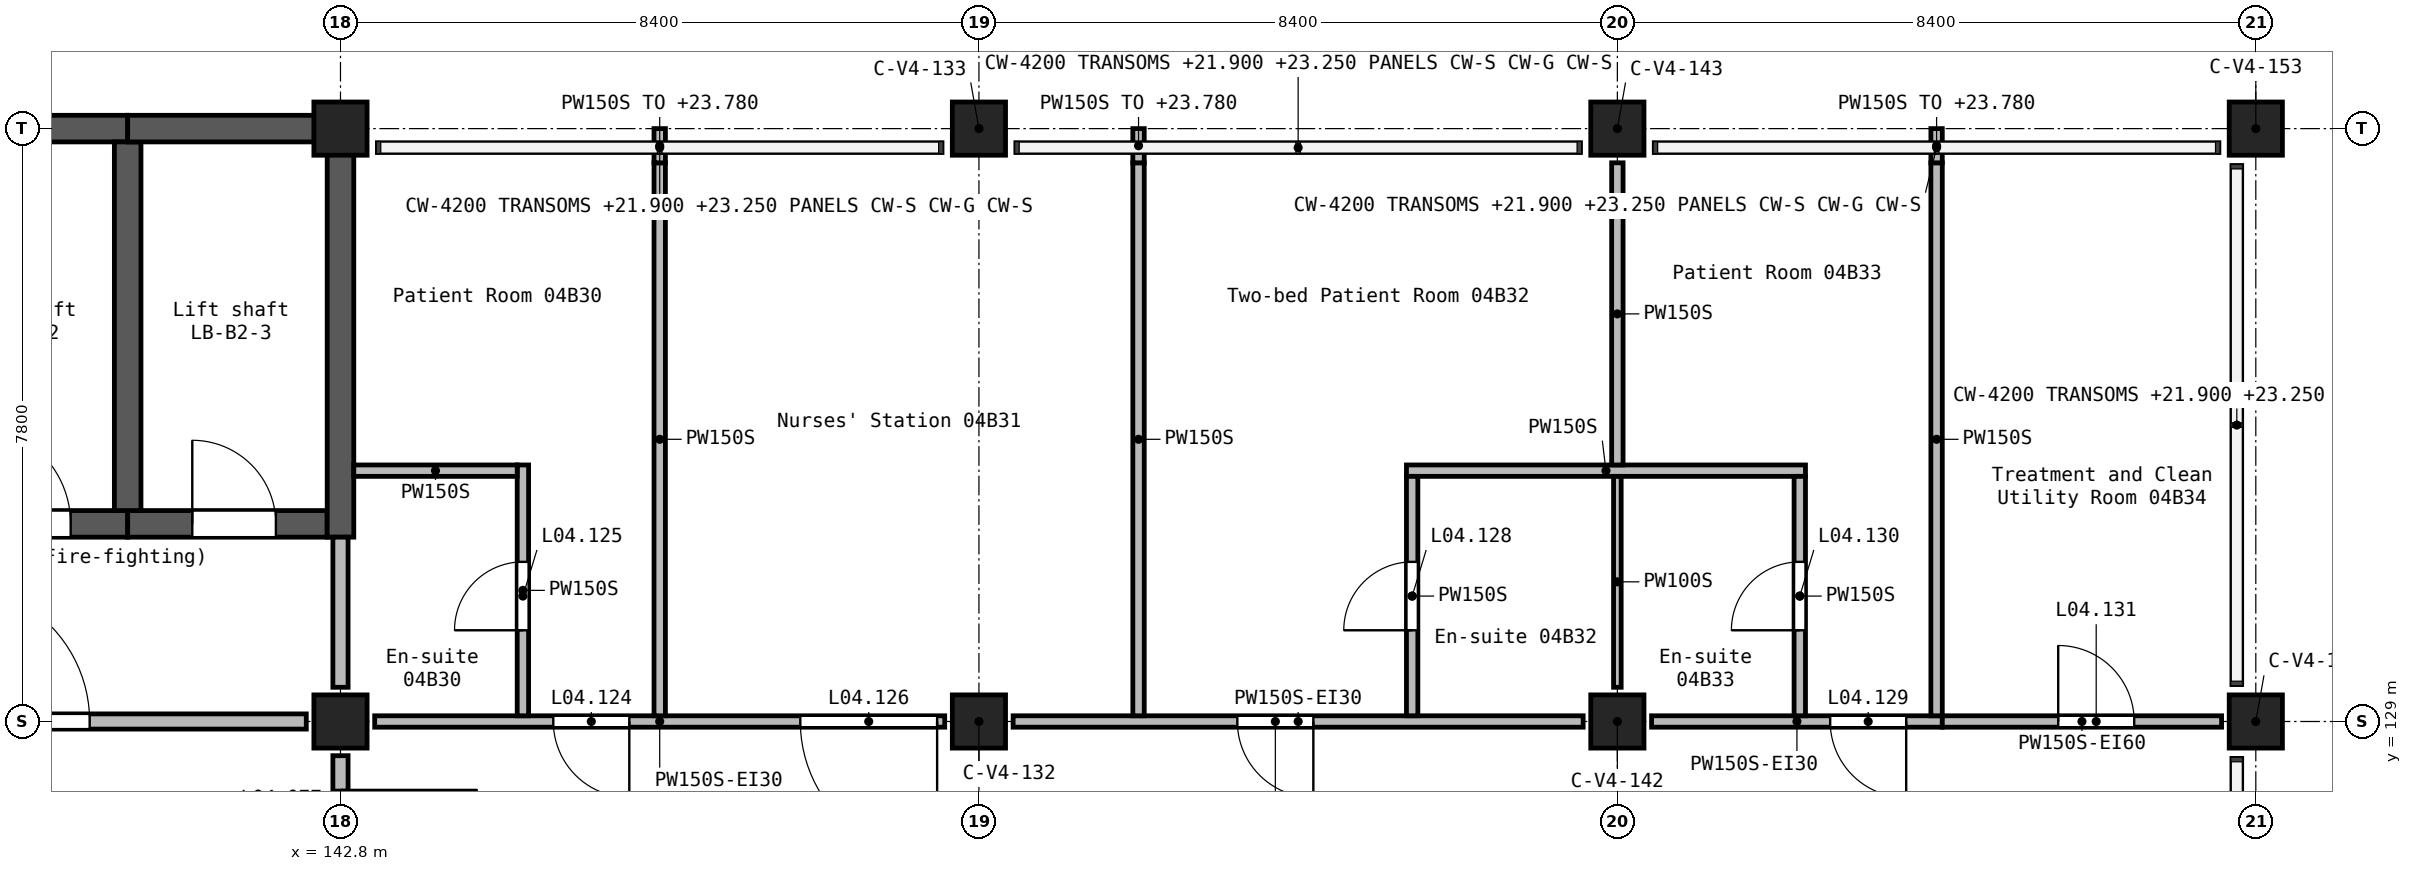
"""IFC4 building model, lengths in metres.
Left out: names, types, materials, properties, quantities, classifications, styles, units other than length and angle.
Written with IfcOpenShell. Run it as: python <this file> out.ifc"""

import sys

from ifc_helpers import new_model, si_unit, direction, frame, frame_2d, origin, origin_2d, place, context, subcontext, project, spatial, rectangle, extrude, element, fill, save


model = new_model("IFC4")
c1 = context("Model", 3, precision=1e-05, world=origin(), true_north=direction((0.0, 1.0)))
c2 = subcontext(c1, "Body", "Model", "MODEL_VIEW")
j1 = project(units=[si_unit("LENGTHUNIT", "METRE"), si_unit("PLANEANGLEUNIT", "RADIAN")], contexts=[c1])
p1 = place(None, origin())
s1 = spatial("IfcSite", under=j1, at=p1, CompositionType="ELEMENT")
p2 = place(p1, origin())
s2 = spatial("IfcBuilding", under=s1, at=p2, CompositionType="ELEMENT")
p3 = place(p2, frame((0.0, 0.0, 21.0)))
s3 = spatial("IfcBuildingStorey", under=s2, at=p3, CompositionType="ELEMENT", Elevation=21.0)
for number, where, z_axis, x_axis in (
    (1, (142.8, 129.0, 0.0), (0.0, 0.0, 1.0), (1.0, 0.0, 0.0)),
    (2, (142.8, 136.8, 0.0), (0.0, 0.0, 1.0), (1.0, 0.0, 0.0)),
    (3, (151.2, 129.0, 0.0), (0.0, 0.0, 1.0), (1.0, 0.0, 0.0)),
    (4, (151.2, 136.8, 0.0), (0.0, 0.0, 1.0), (1.0, 0.0, 0.0)),
    (5, (159.6, 129.0, 0.0), (0.0, 0.0, 1.0), (1.0, 0.0, 0.0)),
    (6, (159.6, 136.8, 0.0), (0.0, 0.0, 1.0), (1.0, 0.0, 0.0)),
    (7, (168.0, 129.0, 0.0), (0.0, 0.0, 1.0), (1.0, 0.0, 0.0)),
    (8, (168.0, 136.8, 0.0), (0.0, 0.0, 1.0), (1.0, 0.0, 0.0)),
):
    element("IfcColumn", number, at=place(p3, frame(where, z_axis=z_axis, x_axis=x_axis)), inside=s3, PredefinedType="COLUMN", context=c2, shape_type="SweptSolid", body=[
        extrude(rectangle(XDim=0.7, YDim=0.7, at=origin_2d()), origin(), (0.0, 0.0, 1.0), 3.9),
    ])
p4 = place(p3, frame((137.2, 131.6, 0.0), z_axis=(0.0, 0.0, 1.0), x_axis=(1.0, 0.0, 0.0)))
e9 = element("IfcWall", 9, at=p4, inside=s3, PredefinedType="SHEAR", context=c2, shape_type="SweptSolid", body=[
    extrude(rectangle(XDim=2.8, YDim=0.35, at=frame_2d((1.4, 0.0))), origin(), (0.0, 0.0, 1.0), 3.9),
])
p5 = place(p4, frame((0.75, 0.0, 0.0)))
e10 = element("IfcOpeningElement", 10, at=p5, cuts=e9, PredefinedType="OPENING", context=c2, shape_type="SweptSolid", body=[
    extrude(rectangle(XDim=1.3, YDim=2.1, at=frame_2d((0.65, 1.05))), frame((0.0, 0.185, 0.0), z_axis=(0.0, -1.0, 0.0), x_axis=(1.0, 0.0, 0.0)), (0.0, 0.0, 1.0), 0.37),
])
p6 = place(p3, frame((137.2, 136.8, 0.0), z_axis=(0.0, 0.0, 1.0), x_axis=(1.0, 0.0, 0.0)))
e11 = element("IfcWall", 11, at=p6, inside=s3, PredefinedType="SHEAR", context=c2, shape_type="SweptSolid", body=[
    extrude(rectangle(XDim=2.8, YDim=0.35, at=frame_2d((1.4, 0.0))), origin(), (0.0, 0.0, 1.0), 3.9),
])
p7 = place(p3, frame((140.0, 131.6, 0.0), z_axis=(0.0, 0.0, 1.0), x_axis=(1.0, 0.0, 0.0)))
e12 = element("IfcWall", 12, at=p7, inside=s3, PredefinedType="SHEAR", context=c2, shape_type="SweptSolid", body=[
    extrude(rectangle(XDim=2.625, YDim=0.35, at=frame_2d((1.312, 0.0))), origin(), (0.0, 0.0, 1.0), 3.9),
])
p8 = place(p7, frame((0.85, 0.0, 0.0)))
e13 = element("IfcOpeningElement", 13, at=p8, cuts=e12, PredefinedType="OPENING", context=c2, shape_type="SweptSolid", body=[
    extrude(rectangle(XDim=1.1, YDim=2.1, at=frame_2d((0.55, 1.05))), frame((0.0, 0.185, 0.0), z_axis=(0.0, -1.0, 0.0), x_axis=(1.0, 0.0, 0.0)), (0.0, 0.0, 1.0), 0.37),
])
p9 = place(p3, frame((140.0, 131.775, 0.0), z_axis=(0.0, 0.0, 1.0), x_axis=(0.0, 1.0, 0.0)))
e14 = element("IfcWall", 14, at=p9, inside=s3, PredefinedType="SHEAR", context=c2, shape_type="SweptSolid", body=[
    extrude(rectangle(XDim=4.85, YDim=0.35, at=frame_2d((2.425, 0.0))), origin(), (0.0, 0.0, 1.0), 3.9),
])
p10 = place(p3, frame((140.0, 136.8, 0.0), z_axis=(0.0, 0.0, 1.0), x_axis=(1.0, 0.0, 0.0)))
e15 = element("IfcWall", 15, at=p10, inside=s3, PredefinedType="SHEAR", context=c2, shape_type="SweptSolid", body=[
    extrude(rectangle(XDim=2.625, YDim=0.35, at=frame_2d((1.312, 0.0))), origin(), (0.0, 0.0, 1.0), 3.9),
])
p11 = place(p3, frame((142.8, 131.425, 0.0), z_axis=(0.0, 0.0, 1.0), x_axis=(0.0, 1.0, 0.0)))
e16 = element("IfcWall", 16, at=p11, inside=s3, PredefinedType="SHEAR", context=c2, shape_type="SweptSolid", body=[
    extrude(rectangle(XDim=5.55, YDim=0.35, at=frame_2d((2.775, 0.0))), origin(), (0.0, 0.0, 1.0), 3.9),
])
p12 = place(p3, frame((142.8, 131.425, 0.0), z_axis=(0.0, 0.0, 1.0), x_axis=(0.0, -1.0, 0.0)))
e17 = element("IfcWall", 17, at=p12, inside=s3, PredefinedType="SOLIDWALL", context=c2, shape_type="SweptSolid", body=[
    extrude(rectangle(XDim=1.975, YDim=0.2, at=frame_2d((0.988, 0.0))), origin(), (0.0, 0.0, 1.0), 3.6),
])
p13 = place(p3, frame((142.8, 128.55, 0.0), z_axis=(0.0, 0.0, 1.0), x_axis=(0.0, -1.0, 0.0)))
e18 = element("IfcWall", 18, at=p13, inside=s3, PredefinedType="SOLIDWALL", context=c2, shape_type="SweptSolid", body=[
    extrude(rectangle(XDim=2.7, YDim=0.2, at=frame_2d((1.35, 0.0))), origin(), (0.0, 0.0, 1.0), 3.6),
])
p14 = place(p13, frame((0.45, 0.0, 0.0)))
e19 = element("IfcOpeningElement", 19, at=p14, cuts=e18, PredefinedType="OPENING", context=c2, shape_type="SweptSolid", body=[
    extrude(rectangle(XDim=1.8, YDim=2.1, at=frame_2d((0.9, 1.05))), frame((0.0, 0.11, 0.0), z_axis=(0.0, -1.0, 0.0), x_axis=(1.0, 0.0, 0.0)), (0.0, 0.0, 1.0), 0.22),
])
p15 = place(p3, frame((134.85, 129.0, 0.0), z_axis=(0.0, 0.0, 1.0), x_axis=(1.0, 0.0, 0.0)))
e20 = element("IfcWall", 20, at=p15, inside=s3, PredefinedType="SOLIDWALL", context=c2, shape_type="SweptSolid", body=[
    extrude(rectangle(XDim=7.5, YDim=0.2, at=frame_2d((3.75, 0.0))), origin(), (0.0, 0.0, 1.0), 3.6),
])
p16 = place(p15, frame((2.85, 0.0, 0.0)))
e21 = element("IfcOpeningElement", 21, at=p16, cuts=e20, PredefinedType="OPENING", context=c2, shape_type="SweptSolid", body=[
    extrude(rectangle(XDim=1.8, YDim=2.1, at=frame_2d((0.9, 1.05))), frame((0.0, 0.11, 0.0), z_axis=(0.0, -1.0, 0.0), x_axis=(1.0, 0.0, 0.0)), (0.0, 0.0, 1.0), 0.22),
])
p17 = place(p3, frame((163.875, 129.0, 0.0), z_axis=(0.0, 0.0, 1.0), x_axis=(-1.0, 0.0, 0.0)))
e22 = element("IfcWall", 22, at=p17, inside=s3, PredefinedType="PARTITIONING", context=c2, shape_type="SweptSolid", body=[
    extrude(rectangle(XDim=3.825, YDim=0.15, at=frame_2d((1.913, 0.0))), origin(), (0.0, 0.0, 1.0), 3.6),
])
p18 = place(p17, frame((0.475, 0.0, 0.0)))
e23 = element("IfcOpeningElement", 23, at=p18, cuts=e22, PredefinedType="OPENING", context=c2, shape_type="SweptSolid", body=[
    extrude(rectangle(XDim=1.0, YDim=2.1, at=frame_2d((0.5, 1.05))), frame((0.0, 0.085, 0.0), z_axis=(0.0, -1.0, 0.0), x_axis=(1.0, 0.0, 0.0)), (0.0, 0.0, 1.0), 0.17),
])
p19 = place(p3, frame((159.15, 129.0, 0.0), z_axis=(0.0, 0.0, 1.0), x_axis=(-1.0, 0.0, 0.0)))
e24 = element("IfcWall", 24, at=p19, inside=s3, PredefinedType="PARTITIONING", context=c2, shape_type="SweptSolid", body=[
    extrude(rectangle(XDim=7.5, YDim=0.15, at=frame_2d((3.75, 0.0))), origin(), (0.0, 0.0, 1.0), 3.6),
])
p20 = place(p19, frame((3.55, 0.0, 0.0)))
e25 = element("IfcOpeningElement", 25, at=p20, cuts=e24, PredefinedType="OPENING", context=c2, shape_type="SweptSolid", body=[
    extrude(rectangle(XDim=1.0, YDim=2.1, at=frame_2d((0.5, 1.05))), frame((0.0, 0.085, 0.0), z_axis=(0.0, -1.0, 0.0), x_axis=(1.0, 0.0, 0.0)), (0.0, 0.0, 1.0), 0.17),
])
p21 = place(p3, frame((150.75, 129.0, 0.0), z_axis=(0.0, 0.0, 1.0), x_axis=(-1.0, 0.0, 0.0)))
e26 = element("IfcWall", 26, at=p21, inside=s3, PredefinedType="PARTITIONING", context=c2, shape_type="SweptSolid", body=[
    extrude(rectangle(XDim=7.5, YDim=0.15, at=frame_2d((3.75, 0.0))), origin(), (0.0, 0.0, 1.0), 3.6),
])
p22 = place(p21, frame((4.15, 0.0, 0.0)))
e27 = element("IfcOpeningElement", 27, at=p22, cuts=e26, PredefinedType="OPENING", context=c2, shape_type="SweptSolid", body=[
    extrude(rectangle(XDim=1.0, YDim=2.1, at=frame_2d((0.5, 1.05))), frame((0.0, 0.085, 0.0), z_axis=(0.0, -1.0, 0.0), x_axis=(1.0, 0.0, 0.0)), (0.0, 0.0, 1.0), 0.17),
])
p23 = place(p21, frame((0.1, 0.0, 0.0)))
e28 = element("IfcOpeningElement", 28, at=p23, cuts=e26, PredefinedType="OPENING", context=c2, shape_type="SweptSolid", body=[
    extrude(rectangle(XDim=1.8, YDim=2.1, at=frame_2d((0.9, 1.05))), frame((0.0, 0.085, 0.0), z_axis=(0.0, -1.0, 0.0), x_axis=(1.0, 0.0, 0.0)), (0.0, 0.0, 1.0), 0.17),
])
p24 = place(p3, frame((163.875, 129.0, 0.0), z_axis=(0.0, 0.0, 1.0), x_axis=(1.0, 0.0, 0.0)))
e29 = element("IfcWall", 29, at=p24, inside=s3, PredefinedType="PARTITIONING", context=c2, shape_type="SweptSolid", body=[
    extrude(rectangle(XDim=3.675, YDim=0.15, at=frame_2d((1.837, 0.0))), origin(), (0.0, 0.0, 1.0), 3.6),
])
p25 = place(p24, frame((1.525, 0.0, 0.0)))
e30 = element("IfcOpeningElement", 30, at=p25, cuts=e29, PredefinedType="OPENING", context=c2, shape_type="SweptSolid", body=[
    extrude(rectangle(XDim=1.0, YDim=2.1, at=frame_2d((0.5, 1.05))), frame((0.0, 0.085, 0.0), z_axis=(0.0, -1.0, 0.0), x_axis=(1.0, 0.0, 0.0)), (0.0, 0.0, 1.0), 0.17),
])
p26 = place(p3, frame((147.0, 129.075, 0.0), z_axis=(0.0, 0.0, 1.0), x_axis=(0.0, 1.0, 0.0)))
e31 = element("IfcWall", 31, at=p26, inside=s3, PredefinedType="PARTITIONING", context=c2, shape_type="SweptSolid", body=[
    extrude(rectangle(XDim=7.275, YDim=0.15, at=frame_2d((3.638, 0.0))), origin(), (0.0, 0.0, 1.0), 3.6),
])
p27 = place(p3, frame((147.0, 136.35, 0.0), z_axis=(0.0, 0.0, 1.0), x_axis=(0.0, 1.0, 0.0)))
e32 = element("IfcWall", 32, at=p27, inside=s3, PredefinedType="PARTITIONING", context=c2, shape_type="SweptSolid", body=[
    extrude(rectangle(XDim=0.45, YDim=0.15, at=frame_2d((0.225, 0.0))), origin(), (0.0, 0.0, 1.0), 2.78),
])
p28 = place(p3, frame((153.3, 129.075, 0.0), z_axis=(0.0, 0.0, 1.0), x_axis=(0.0, 1.0, 0.0)))
e33 = element("IfcWall", 33, at=p28, inside=s3, PredefinedType="PARTITIONING", context=c2, shape_type="SweptSolid", body=[
    extrude(rectangle(XDim=7.275, YDim=0.15, at=frame_2d((3.638, 0.0))), origin(), (0.0, 0.0, 1.0), 3.6),
])
p29 = place(p3, frame((153.3, 136.35, 0.0), z_axis=(0.0, 0.0, 1.0), x_axis=(0.0, 1.0, 0.0)))
e34 = element("IfcWall", 34, at=p29, inside=s3, PredefinedType="PARTITIONING", context=c2, shape_type="SweptSolid", body=[
    extrude(rectangle(XDim=0.45, YDim=0.15, at=frame_2d((0.225, 0.0))), origin(), (0.0, 0.0, 1.0), 2.78),
])
p30 = place(p3, frame((163.8, 129.075, 0.0), z_axis=(0.0, 0.0, 1.0), x_axis=(0.0, 1.0, 0.0)))
e35 = element("IfcWall", 35, at=p30, inside=s3, PredefinedType="PARTITIONING", context=c2, shape_type="SweptSolid", body=[
    extrude(rectangle(XDim=7.275, YDim=0.15, at=frame_2d((3.638, 0.0))), origin(), (0.0, 0.0, 1.0), 3.6),
])
p31 = place(p3, frame((163.8, 136.35, 0.0), z_axis=(0.0, 0.0, 1.0), x_axis=(0.0, 1.0, 0.0)))
e36 = element("IfcWall", 36, at=p31, inside=s3, PredefinedType="PARTITIONING", context=c2, shape_type="SweptSolid", body=[
    extrude(rectangle(XDim=0.45, YDim=0.15, at=frame_2d((0.225, 0.0))), origin(), (0.0, 0.0, 1.0), 2.78),
])
p32 = place(p3, frame((156.825, 132.3, 0.0), z_axis=(0.0, 0.0, 1.0), x_axis=(1.0, 0.0, 0.0)))
e37 = element("IfcWall", 37, at=p32, inside=s3, PredefinedType="PARTITIONING", context=c2, shape_type="SweptSolid", body=[
    extrude(rectangle(XDim=5.25, YDim=0.15, at=frame_2d((2.625, 0.0))), origin(), (0.0, 0.0, 1.0), 3.6),
])
p33 = place(p3, frame((159.6, 132.375, 0.0), z_axis=(0.0, 0.0, 1.0), x_axis=(0.0, 1.0, 0.0)))
e38 = element("IfcWall", 38, at=p33, inside=s3, PredefinedType="PARTITIONING", context=c2, shape_type="SweptSolid", body=[
    extrude(rectangle(XDim=3.975, YDim=0.15, at=frame_2d((1.988, 0.0))), origin(), (0.0, 0.0, 1.0), 3.6),
])
p34 = place(p3, frame((145.2, 129.075, 0.0), z_axis=(0.0, 0.0, 1.0), x_axis=(0.0, 1.0, 0.0)))
e39 = element("IfcWall", 39, at=p34, inside=s3, PredefinedType="PARTITIONING", context=c2, shape_type="SweptSolid", body=[
    extrude(rectangle(XDim=3.3, YDim=0.15, at=frame_2d((1.65, 0.0))), origin(), (0.0, 0.0, 1.0), 3.6),
])
p35 = place(p34, frame((1.125, 0.0, 0.0)))
e40 = element("IfcOpeningElement", 40, at=p35, cuts=e39, PredefinedType="OPENING", context=c2, shape_type="SweptSolid", body=[
    extrude(rectangle(XDim=0.9, YDim=2.1, at=frame_2d((0.45, 1.05))), frame((0.0, 0.085, 0.0), z_axis=(0.0, -1.0, 0.0), x_axis=(1.0, 0.0, 0.0)), (0.0, 0.0, 1.0), 0.17),
])
p36 = place(p3, frame((156.9, 129.075, 0.0), z_axis=(0.0, 0.0, 1.0), x_axis=(0.0, 1.0, 0.0)))
e41 = element("IfcWall", 41, at=p36, inside=s3, PredefinedType="PARTITIONING", context=c2, shape_type="SweptSolid", body=[
    extrude(rectangle(XDim=3.15, YDim=0.15, at=frame_2d((1.575, 0.0))), origin(), (0.0, 0.0, 1.0), 3.6),
])
p37 = place(p36, frame((1.125, 0.0, 0.0)))
e42 = element("IfcOpeningElement", 42, at=p37, cuts=e41, PredefinedType="OPENING", context=c2, shape_type="SweptSolid", body=[
    extrude(rectangle(XDim=0.9, YDim=2.1, at=frame_2d((0.45, 1.05))), frame((0.0, 0.085, 0.0), z_axis=(0.0, -1.0, 0.0), x_axis=(1.0, 0.0, 0.0)), (0.0, 0.0, 1.0), 0.17),
])
p38 = place(p3, frame((162.0, 129.075, 0.0), z_axis=(0.0, 0.0, 1.0), x_axis=(0.0, 1.0, 0.0)))
e43 = element("IfcWall", 43, at=p38, inside=s3, PredefinedType="PARTITIONING", context=c2, shape_type="SweptSolid", body=[
    extrude(rectangle(XDim=3.15, YDim=0.15, at=frame_2d((1.575, 0.0))), origin(), (0.0, 0.0, 1.0), 3.6),
])
p39 = place(p38, frame((1.125, 0.0, 0.0)))
e44 = element("IfcOpeningElement", 44, at=p39, cuts=e43, PredefinedType="OPENING", context=c2, shape_type="SweptSolid", body=[
    extrude(rectangle(XDim=0.9, YDim=2.1, at=frame_2d((0.45, 1.05))), frame((0.0, 0.085, 0.0), z_axis=(0.0, -1.0, 0.0), x_axis=(1.0, 0.0, 0.0)), (0.0, 0.0, 1.0), 0.17),
])
p40 = place(p3, frame((142.975, 132.3, 0.0), z_axis=(0.0, 0.0, 1.0), x_axis=(1.0, 0.0, 0.0)))
e45 = element("IfcWall", 45, at=p40, inside=s3, PredefinedType="PARTITIONING", context=c2, shape_type="SweptSolid", body=[
    extrude(rectangle(XDim=2.15, YDim=0.15, at=frame_2d((1.075, 0.0))), origin(), (0.0, 0.0, 1.0), 3.6),
])
p41 = place(p3, frame((159.6, 129.45, 0.0), z_axis=(0.0, 0.0, 1.0), x_axis=(0.0, 1.0, 0.0)))
e46 = element("IfcWall", 46, at=p41, inside=s3, PredefinedType="PARTITIONING", context=c2, shape_type="SweptSolid", body=[
    extrude(rectangle(XDim=2.775, YDim=0.1, at=frame_2d((1.388, 0.0))), origin(), (0.0, 0.0, 1.0), 3.6),
])
p42 = place(p14, origin())
e47 = element("IfcDoor", 47, at=p42, inside=s3, OperationType="DOUBLE_DOOR_SINGLE_SWING", PredefinedType="DOOR", context=c2, shape_type="SweptSolid", body=[
    extrude(rectangle(XDim=1.8, YDim=2.1, at=frame_2d((0.9, 1.05))), frame((0.0, 0.025, 0.0), z_axis=(0.0, -1.0, 0.0), x_axis=(1.0, 0.0, 0.0)), (0.0, 0.0, 1.0), 0.05),
])
fill(e19, e47)
p43 = place(p22, frame((1.0, 0.0, 0.0), z_axis=(0.0, 0.0, 1.0), x_axis=(-1.0, 0.0, 0.0)))
e48 = element("IfcDoor", 48, at=p43, inside=s3, OperationType="SINGLE_SWING_LEFT", PredefinedType="DOOR", context=c2, shape_type="SweptSolid", body=[
    extrude(rectangle(XDim=1.0, YDim=2.1, at=frame_2d((0.5, 1.05))), frame((0.0, 0.025, 0.0), z_axis=(0.0, -1.0, 0.0), x_axis=(1.0, 0.0, 0.0)), (0.0, 0.0, 1.0), 0.05),
])
fill(e27, e48)
p44 = place(p35, origin())
e49 = element("IfcDoor", 49, at=p44, inside=s3, OperationType="SINGLE_SWING_LEFT", PredefinedType="DOOR", context=c2, shape_type="SweptSolid", body=[
    extrude(rectangle(XDim=0.9, YDim=2.1, at=frame_2d((0.45, 1.05))), frame((0.0, 0.025, 0.0), z_axis=(0.0, -1.0, 0.0), x_axis=(1.0, 0.0, 0.0)), (0.0, 0.0, 1.0), 0.05),
])
fill(e40, e49)
p45 = place(p23, frame((1.8, 0.0, 0.0), z_axis=(0.0, 0.0, 1.0), x_axis=(-1.0, 0.0, 0.0)))
e50 = element("IfcDoor", 50, at=p45, inside=s3, OperationType="DOUBLE_DOOR_SINGLE_SWING", PredefinedType="DOOR", context=c2, shape_type="SweptSolid", body=[
    extrude(rectangle(XDim=1.8, YDim=2.1, at=frame_2d((0.9, 1.05))), frame((0.0, 0.025, 0.0), z_axis=(0.0, -1.0, 0.0), x_axis=(1.0, 0.0, 0.0)), (0.0, 0.0, 1.0), 0.05),
])
fill(e28, e50)
p46 = place(p20, frame((1.0, 0.0, 0.0), z_axis=(0.0, 0.0, 1.0), x_axis=(-1.0, 0.0, 0.0)))
e51 = element("IfcDoor", 51, at=p46, inside=s3, OperationType="SINGLE_SWING_LEFT", PredefinedType="DOOR", context=c2, shape_type="SweptSolid", body=[
    extrude(rectangle(XDim=1.0, YDim=2.1, at=frame_2d((0.5, 1.05))), frame((0.0, 0.025, 0.0), z_axis=(0.0, -1.0, 0.0), x_axis=(1.0, 0.0, 0.0)), (0.0, 0.0, 1.0), 0.05),
])
fill(e25, e51)
p47 = place(p37, frame((0.9, 0.0, 0.0), z_axis=(0.0, 0.0, 1.0), x_axis=(-1.0, 0.0, 0.0)))
e52 = element("IfcDoor", 52, at=p47, inside=s3, OperationType="SINGLE_SWING_LEFT", PredefinedType="DOOR", context=c2, shape_type="SweptSolid", body=[
    extrude(rectangle(XDim=0.9, YDim=2.1, at=frame_2d((0.45, 1.05))), frame((0.0, 0.025, 0.0), z_axis=(0.0, -1.0, 0.0), x_axis=(1.0, 0.0, 0.0)), (0.0, 0.0, 1.0), 0.05),
])
fill(e42, e52)
p48 = place(p18, frame((1.0, 0.0, 0.0), z_axis=(0.0, 0.0, 1.0), x_axis=(-1.0, 0.0, 0.0)))
e53 = element("IfcDoor", 53, at=p48, inside=s3, OperationType="SINGLE_SWING_RIGHT", PredefinedType="DOOR", context=c2, shape_type="SweptSolid", body=[
    extrude(rectangle(XDim=1.0, YDim=2.1, at=frame_2d((0.5, 1.05))), frame((0.0, 0.025, 0.0), z_axis=(0.0, -1.0, 0.0), x_axis=(1.0, 0.0, 0.0)), (0.0, 0.0, 1.0), 0.05),
])
fill(e23, e53)
p49 = place(p39, origin())
e54 = element("IfcDoor", 54, at=p49, inside=s3, OperationType="SINGLE_SWING_RIGHT", PredefinedType="DOOR", context=c2, shape_type="SweptSolid", body=[
    extrude(rectangle(XDim=0.9, YDim=2.1, at=frame_2d((0.45, 1.05))), frame((0.0, 0.025, 0.0), z_axis=(0.0, -1.0, 0.0), x_axis=(1.0, 0.0, 0.0)), (0.0, 0.0, 1.0), 0.05),
])
fill(e44, e54)
p50 = place(p25, origin())
e55 = element("IfcDoor", 55, at=p50, inside=s3, OperationType="SINGLE_SWING_RIGHT", PredefinedType="DOOR", context=c2, shape_type="SweptSolid", body=[
    extrude(rectangle(XDim=1.0, YDim=2.1, at=frame_2d((0.5, 1.05))), frame((0.0, 0.025, 0.0), z_axis=(0.0, -1.0, 0.0), x_axis=(1.0, 0.0, 0.0)), (0.0, 0.0, 1.0), 0.05),
])
fill(e30, e55)
p51 = place(p16, origin())
e56 = element("IfcDoor", 56, at=p51, inside=s3, OperationType="DOUBLE_DOOR_SINGLE_SWING", PredefinedType="DOOR", context=c2, shape_type="SweptSolid", body=[
    extrude(rectangle(XDim=1.8, YDim=2.1, at=frame_2d((0.9, 1.05))), frame((0.0, 0.025, 0.0), z_axis=(0.0, -1.0, 0.0), x_axis=(1.0, 0.0, 0.0)), (0.0, 0.0, 1.0), 0.05),
])
fill(e21, e56)
p52 = place(p5, origin())
e57 = element("IfcDoor", 57, at=p52, inside=s3, OperationType="DOUBLE_DOOR_SLIDING", PredefinedType="DOOR", context=c2, shape_type="SweptSolid", body=[
    extrude(rectangle(XDim=1.3, YDim=2.1, at=frame_2d((0.65, 1.05))), frame((0.0, 0.025, 0.0), z_axis=(0.0, -1.0, 0.0), x_axis=(1.0, 0.0, 0.0)), (0.0, 0.0, 1.0), 0.05),
])
fill(e10, e57)
p53 = place(p8, origin())
e58 = element("IfcDoor", 58, at=p53, inside=s3, OperationType="DOUBLE_DOOR_SLIDING", PredefinedType="DOOR", context=c2, shape_type="SweptSolid", body=[
    extrude(rectangle(XDim=1.1, YDim=2.1, at=frame_2d((0.55, 1.05))), frame((0.0, 0.025, 0.0), z_axis=(0.0, -1.0, 0.0), x_axis=(1.0, 0.0, 0.0)), (0.0, 0.0, 1.0), 0.05),
])
fill(e13, e58)
save(model, sys.argv[1])
